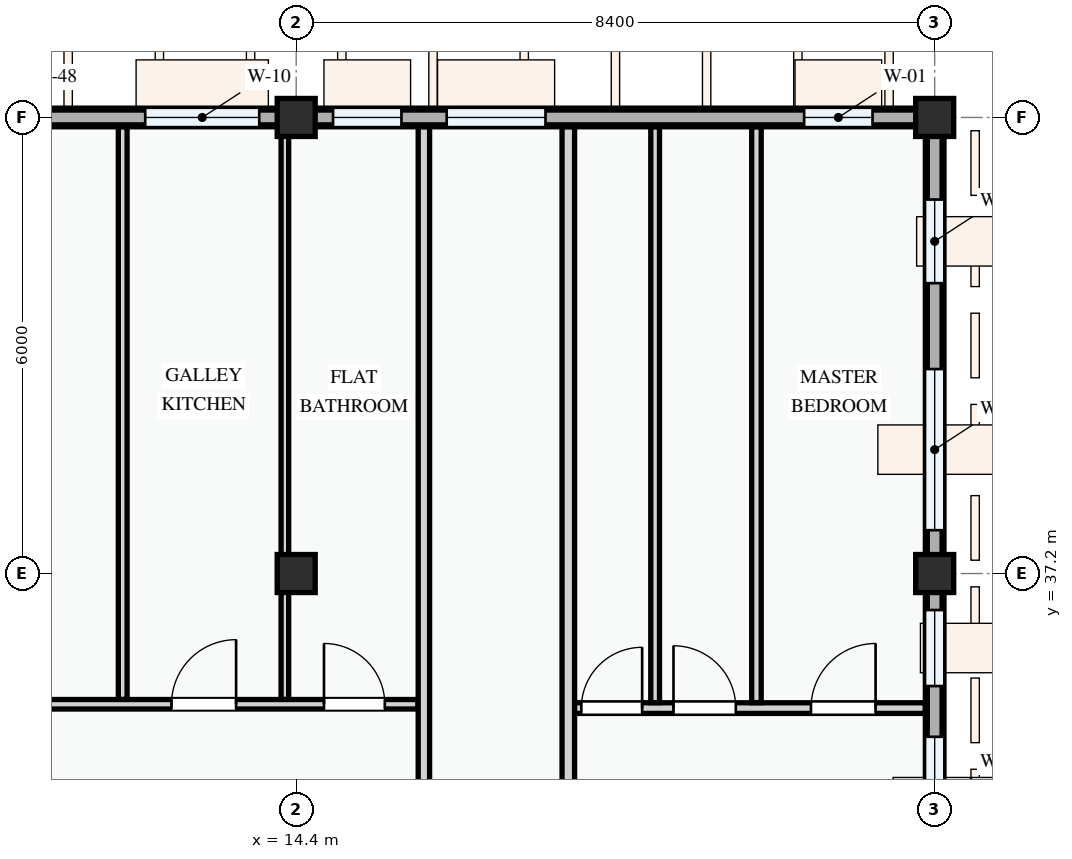
"""IFC4 building model, lengths in metres.
Left out: names, types, materials, properties, quantities, classifications, styles, units other than length and angle.
Written with IfcOpenShell. Run it as: python <this file> out.ifc"""

import sys

from ifc_helpers import new_model, si_unit, direction, frame, frame_2d, origin, origin_2d, place, context, subcontext, project, spatial, rectangle, extrude, element, fill, save


model = new_model("IFC4")
c1 = context("Model", 3, precision=1e-05, world=origin(), true_north=direction((0.0, 1.0)))
c2 = subcontext(c1, "Body", "Model", "MODEL_VIEW")
j1 = project(units=[si_unit("LENGTHUNIT", "METRE"), si_unit("PLANEANGLEUNIT", "RADIAN")], contexts=[c1])
p1 = place(None, origin())
s1 = spatial("IfcSite", under=j1, at=p1, CompositionType="ELEMENT")
p2 = place(p1, origin())
s2 = spatial("IfcBuilding", under=s1, at=p2, CompositionType="ELEMENT")
p3 = place(p2, frame((0.0, 0.0, 34.5)))
s3 = spatial("IfcBuildingStorey", under=s2, at=p3, CompositionType="ELEMENT", Elevation=34.5)
for number, where, z_axis, x_axis in (
    (1, (14.4, 37.2, 0.0), (0.0, 0.0, 1.0), (1.0, 0.0, 0.0)),
    (2, (14.4, 43.2, 0.0), (0.0, 0.0, 1.0), (1.0, 0.0, 0.0)),
    (3, (22.8, 37.2, 0.0), (0.0, 0.0, 1.0), (1.0, 0.0, 0.0)),
    (4, (22.8, 43.2, 0.0), (0.0, 0.0, 1.0), (1.0, 0.0, 0.0)),
):
    element("IfcColumn", number, at=place(p3, frame(where, z_axis=z_axis, x_axis=x_axis)), inside=s3, PredefinedType="COLUMN", context=c2, shape_type="SweptSolid", body=[
        extrude(rectangle(XDim=0.5, YDim=0.5, at=origin_2d()), origin(), (0.0, 0.0, 1.0), 3.3),
    ])
p4 = place(p3, frame((22.8, 28.8, 0.0), z_axis=(0.0, 0.0, 1.0), x_axis=(0.0, 1.0, 0.0)))
e5 = element("IfcWall", 5, at=p4, inside=s3, PredefinedType="STANDARD", context=c2, shape_type="SweptSolid", body=[
    extrude(rectangle(XDim=8.4, YDim=0.245, at=frame_2d((4.2, 0.0))), origin(), (0.0, 0.0, 1.0), 2.425),
])
p5 = place(p4, frame((0.53, 0.0, 0.78)))
e6 = element("IfcOpeningElement", 6, at=p5, cuts=e5, PredefinedType="OPENING", context=c2, shape_type="SweptSolid", body=[
    extrude(rectangle(XDim=0.95, YDim=1.15, at=frame_2d((0.475, 0.575))), frame((0.0, 0.133, 0.0), z_axis=(0.0, -1.0, 0.0), x_axis=(1.0, 0.0, 0.0)), (0.0, 0.0, 1.0), 0.265),
])
p6 = place(p4, frame((2.367, 0.0, 0.78)))
e7 = element("IfcOpeningElement", 7, at=p6, cuts=e5, PredefinedType="OPENING", context=c2, shape_type="SweptSolid", body=[
    extrude(rectangle(XDim=1.38, YDim=1.48, at=frame_2d((0.69, 0.74))), frame((0.0, 0.133, 0.0), z_axis=(0.0, -1.0, 0.0), x_axis=(1.0, 0.0, 0.0)), (0.0, 0.0, 1.0), 0.265),
])
p7 = place(p4, frame((4.532, 0.0, 0.78)))
e8 = element("IfcOpeningElement", 8, at=p7, cuts=e5, PredefinedType="OPENING", context=c2, shape_type="SweptSolid", body=[
    extrude(rectangle(XDim=1.72, YDim=1.52, at=frame_2d((0.86, 0.76))), frame((0.0, 0.133, 0.0), z_axis=(0.0, -1.0, 0.0), x_axis=(1.0, 0.0, 0.0)), (0.0, 0.0, 1.0), 0.265),
])
p8 = place(p4, frame((6.92, 0.0, 0.78)))
e9 = element("IfcOpeningElement", 9, at=p8, cuts=e5, PredefinedType="OPENING", context=c2, shape_type="SweptSolid", body=[
    extrude(rectangle(XDim=1.0, YDim=1.25, at=frame_2d((0.5, 0.625))), frame((0.0, 0.133, 0.0), z_axis=(0.0, -1.0, 0.0), x_axis=(1.0, 0.0, 0.0)), (0.0, 0.0, 1.0), 0.265),
])
p9 = place(p3, frame((22.8, 37.2, 0.0), z_axis=(0.0, 0.0, 1.0), x_axis=(0.0, 1.0, 0.0)))
e10 = element("IfcWall", 10, at=p9, inside=s3, PredefinedType="STANDARD", context=c2, shape_type="SweptSolid", body=[
    extrude(rectangle(XDim=6.0, YDim=0.245, at=frame_2d((3.0, 0.0))), origin(), (0.0, 0.0, 1.0), 2.575),
])
p10 = place(p9, frame((0.57, 0.0, 0.78)))
e11 = element("IfcOpeningElement", 11, at=p10, cuts=e10, PredefinedType="OPENING", context=c2, shape_type="SweptSolid", body=[
    extrude(rectangle(XDim=2.12, YDim=1.44, at=frame_2d((1.06, 0.72))), frame((0.0, 0.133, 0.0), z_axis=(0.0, -1.0, 0.0), x_axis=(1.0, 0.0, 0.0)), (0.0, 0.0, 1.0), 0.265),
])
p11 = place(p9, frame((3.82, 0.0, 0.78)))
e12 = element("IfcOpeningElement", 12, at=p11, cuts=e10, PredefinedType="OPENING", context=c2, shape_type="SweptSolid", body=[
    extrude(rectangle(XDim=1.1, YDim=1.3, at=frame_2d((0.55, 0.65))), frame((0.0, 0.133, 0.0), z_axis=(0.0, -1.0, 0.0), x_axis=(1.0, 0.0, 0.0)), (0.0, 0.0, 1.0), 0.265),
])
p12 = place(p3, frame((22.8, 43.2, 0.0), z_axis=(0.0, 0.0, 1.0), x_axis=(-1.0, 0.0, 0.0)))
e13 = element("IfcWall", 13, at=p12, inside=s3, PredefinedType="STANDARD", context=c2, shape_type="SweptSolid", body=[
    extrude(rectangle(XDim=8.4, YDim=0.245, at=frame_2d((4.2, 0.0))), origin(), (0.0, 0.0, 1.0), 2.375),
])
p13 = place(p12, frame((0.817, 0.0, 0.78)))
e14 = element("IfcOpeningElement", 14, at=p13, cuts=e13, PredefinedType="OPENING", context=c2, shape_type="SweptSolid", body=[
    extrude(rectangle(XDim=0.9, YDim=1.2, at=frame_2d((0.45, 0.6))), frame((0.0, 0.133, 0.0), z_axis=(0.0, -1.0, 0.0), x_axis=(1.0, 0.0, 0.0)), (0.0, 0.0, 1.0), 0.265),
])
p14 = place(p12, frame((5.12, 0.0, 0.78)))
e15 = element("IfcOpeningElement", 15, at=p14, cuts=e13, PredefinedType="OPENING", context=c2, shape_type="SweptSolid", body=[
    extrude(rectangle(XDim=1.3, YDim=1.4, at=frame_2d((0.65, 0.7))), frame((0.0, 0.133, 0.0), z_axis=(0.0, -1.0, 0.0), x_axis=(1.0, 0.0, 0.0)), (0.0, 0.0, 1.0), 0.265),
])
p15 = place(p12, frame((7.015, 0.0, 0.78)))
e16 = element("IfcOpeningElement", 16, at=p15, cuts=e13, PredefinedType="OPENING", context=c2, shape_type="SweptSolid", body=[
    extrude(rectangle(XDim=0.9, YDim=1.2, at=frame_2d((0.45, 0.6))), frame((0.0, 0.133, 0.0), z_axis=(0.0, -1.0, 0.0), x_axis=(1.0, 0.0, 0.0)), (0.0, 0.0, 1.0), 0.265),
])
p16 = place(p3, frame((14.4, 43.2, 0.0), z_axis=(0.0, 0.0, 1.0), x_axis=(-1.0, 0.0, 0.0)))
e17 = element("IfcWall", 17, at=p16, inside=s3, PredefinedType="STANDARD", context=c2, shape_type="SweptSolid", body=[
    extrude(rectangle(XDim=6.0, YDim=0.245, at=frame_2d((3.0, 0.0))), origin(), (0.0, 0.0, 1.0), 2.525),
])
p17 = place(p16, frame((0.486, 0.0, 0.78)))
e18 = element("IfcOpeningElement", 18, at=p17, cuts=e17, PredefinedType="OPENING", context=c2, shape_type="SweptSolid", body=[
    extrude(rectangle(XDim=1.5, YDim=1.5, at=frame_2d((0.75, 0.75))), frame((0.0, 0.133, 0.0), z_axis=(0.0, -1.0, 0.0), x_axis=(1.0, 0.0, 0.0)), (0.0, 0.0, 1.0), 0.265),
])
p18 = place(p16, frame((3.386, 0.0, 0.78)))
e19 = element("IfcOpeningElement", 19, at=p18, cuts=e17, PredefinedType="OPENING", context=c2, shape_type="SweptSolid", body=[
    extrude(rectangle(XDim=1.32, YDim=1.35, at=frame_2d((0.66, 0.675))), frame((0.0, 0.133, 0.0), z_axis=(0.0, -1.0, 0.0), x_axis=(1.0, 0.0, 0.0)), (0.0, 0.0, 1.0), 0.265),
])
p19 = place(p3, frame((22.8, 22.8, 3.3), z_axis=(0.0, 0.0, 1.0), x_axis=(0.0, 1.0, 0.0)))
e20 = element("IfcWall", 20, at=p19, inside=s3, PredefinedType="PARAPET", context=c2, shape_type="SweptSolid", body=[
    extrude(rectangle(XDim=20.4, YDim=0.195, at=frame_2d((10.2, 0.0))), origin(), (0.0, 0.0, 1.0), 1.15),
])
p20 = place(p3, frame((22.8, 43.2, 3.3), z_axis=(0.0, 0.0, 1.0), x_axis=(-1.0, 0.0, 0.0)))
e21 = element("IfcWall", 21, at=p20, inside=s3, PredefinedType="PARAPET", context=c2, shape_type="SweptSolid", body=[
    extrude(rectangle(XDim=14.4, YDim=0.195, at=frame_2d((7.2, 0.0))), origin(), (0.0, 0.0, 1.0), 1.15),
])
p21 = place(p3, frame((8.524, 35.48, 0.0), z_axis=(0.0, 0.0, 1.0), x_axis=(1.0, 0.0, 0.0)))
e22 = element("IfcWall", 22, at=p21, inside=s3, PredefinedType="PARTITIONING", context=c2, shape_type="SweptSolid", body=[
    extrude(rectangle(XDim=7.479, YDim=0.125, at=frame_2d((3.739, 0.0))), origin(), (0.0, 0.0, 1.0), 3.0),
])
p22 = place(p21, frame((1.339, 0.0, 0.0)))
e23 = element("IfcOpeningElement", 23, at=p22, cuts=e22, PredefinedType="OPENING", context=c2, shape_type="SweptSolid", body=[
    extrude(rectangle(XDim=0.82, YDim=2.08, at=frame_2d((0.41, 1.04))), frame((0.0, 0.073, 0.0), z_axis=(0.0, -1.0, 0.0), x_axis=(1.0, 0.0, 0.0)), (0.0, 0.0, 1.0), 0.145),
])
p23 = place(p21, frame((4.235, 0.0, 0.0)))
e24 = element("IfcOpeningElement", 24, at=p23, cuts=e22, PredefinedType="OPENING", context=c2, shape_type="SweptSolid", body=[
    extrude(rectangle(XDim=0.85, YDim=2.1, at=frame_2d((0.425, 1.05))), frame((0.0, 0.073, 0.0), z_axis=(0.0, -1.0, 0.0), x_axis=(1.0, 0.0, 0.0)), (0.0, 0.0, 1.0), 0.145),
])
p24 = place(p21, frame((6.241, 0.0, 0.0)))
e25 = element("IfcOpeningElement", 25, at=p24, cuts=e22, PredefinedType="OPENING", context=c2, shape_type="SweptSolid", body=[
    extrude(rectangle(XDim=0.8, YDim=2.1, at=frame_2d((0.4, 1.05))), frame((0.0, 0.073, 0.0), z_axis=(0.0, -1.0, 0.0), x_axis=(1.0, 0.0, 0.0)), (0.0, 0.0, 1.0), 0.145),
])
p25 = place(p3, frame((12.118, 35.544, 0.0), z_axis=(0.0, 0.0, 1.0), x_axis=(0.0, 1.0, 0.0)))
e26 = element("IfcWall", 26, at=p25, inside=s3, PredefinedType="PARTITIONING", context=c2, shape_type="SweptSolid", body=[
    extrude(rectangle(XDim=7.531, YDim=0.115, at=frame_2d((3.766, 0.0))), origin(), (0.0, 0.0, 1.0), 3.0),
])
p26 = place(p3, frame((14.251, 35.544, 0.0), z_axis=(0.0, 0.0, 1.0), x_axis=(0.0, 1.0, 0.0)))
e27 = element("IfcWall", 27, at=p26, inside=s3, PredefinedType="PARTITIONING", context=c2, shape_type="SweptSolid", body=[
    extrude(rectangle(XDim=7.531, YDim=0.1, at=frame_2d((3.766, 0.0))), origin(), (0.0, 0.0, 1.0), 2.425),
])
p27 = place(p3, frame((17.98, 35.43, 0.0), z_axis=(0.0, 0.0, 1.0), x_axis=(1.0, 0.0, 0.0)))
e28 = element("IfcWall", 28, at=p27, inside=s3, PredefinedType="PARTITIONING", context=c2, shape_type="SweptSolid", body=[
    extrude(rectangle(XDim=4.696, YDim=0.14, at=frame_2d((2.348, 0.0))), origin(), (0.0, 0.0, 1.0), 3.0),
])
p28 = place(p27, frame((0.171, 0.0, 0.0)))
e29 = element("IfcOpeningElement", 29, at=p28, cuts=e28, PredefinedType="OPENING", context=c2, shape_type="SweptSolid", body=[
    extrude(rectangle(XDim=0.8, YDim=2.1, at=frame_2d((0.4, 1.05))), frame((0.0, 0.08, 0.0), z_axis=(0.0, -1.0, 0.0), x_axis=(1.0, 0.0, 0.0)), (0.0, 0.0, 1.0), 0.16),
])
p29 = place(p27, frame((1.384, 0.0, 0.0)))
e30 = element("IfcOpeningElement", 30, at=p29, cuts=e28, PredefinedType="OPENING", context=c2, shape_type="SweptSolid", body=[
    extrude(rectangle(XDim=0.82, YDim=2.08, at=frame_2d((0.41, 1.04))), frame((0.0, 0.08, 0.0), z_axis=(0.0, -1.0, 0.0), x_axis=(1.0, 0.0, 0.0)), (0.0, 0.0, 1.0), 0.16),
])
p30 = place(p27, frame((3.193, 0.0, 0.0)))
e31 = element("IfcOpeningElement", 31, at=p30, cuts=e28, PredefinedType="OPENING", context=c2, shape_type="SweptSolid", body=[
    extrude(rectangle(XDim=0.85, YDim=2.1, at=frame_2d((0.425, 1.05))), frame((0.0, 0.08, 0.0), z_axis=(0.0, -1.0, 0.0), x_axis=(1.0, 0.0, 0.0)), (0.0, 0.0, 1.0), 0.16),
])
p31 = place(p3, frame((20.455, 35.502, 0.0), z_axis=(0.0, 0.0, 1.0), x_axis=(0.0, 1.0, 0.0)))
e32 = element("IfcWall", 32, at=p31, inside=s3, PredefinedType="PARTITIONING", context=c2, shape_type="SweptSolid", body=[
    extrude(rectangle(XDim=7.574, YDim=0.125, at=frame_2d((3.787, 0.0))), origin(), (0.0, 0.0, 1.0), 3.0),
])
p32 = place(p3, frame((19.122, 35.502, 0.0), z_axis=(0.0, 0.0, 1.0), x_axis=(0.0, 1.0, 0.0)))
e33 = element("IfcWall", 33, at=p32, inside=s3, PredefinedType="PARTITIONING", context=c2, shape_type="SweptSolid", body=[
    extrude(rectangle(XDim=7.574, YDim=0.115, at=frame_2d((3.787, 0.0))), origin(), (0.0, 0.0, 1.0), 3.0),
])
p33 = place(p3, frame((16.08, 22.66, 0.0), z_axis=(0.0, 0.0, 1.0), x_axis=(0.0, 1.0, 0.0)))
e34 = element("IfcWall", 34, at=p33, inside=s3, PredefinedType="PARTITIONING", context=c2, shape_type="SweptSolid", body=[
    extrude(rectangle(XDim=20.416, YDim=0.15, at=frame_2d((10.208, 0.0))), origin(), (0.0, 0.0, 1.0), 3.0),
])
p34 = place(p33, frame((2.691, 0.0, 0.0)))
e35 = element("IfcOpeningElement", 35, at=p34, cuts=e34, PredefinedType="OPENING", context=c2, shape_type="SweptSolid", body=[
    extrude(rectangle(XDim=0.92, YDim=2.1, at=frame_2d((0.46, 1.05))), frame((0.0, 0.085, 0.0), z_axis=(0.0, -1.0, 0.0), x_axis=(1.0, 0.0, 0.0)), (0.0, 0.0, 1.0), 0.17),
])
p35 = place(p33, frame((9.91, 0.0, 0.0)))
e36 = element("IfcOpeningElement", 36, at=p35, cuts=e34, PredefinedType="OPENING", context=c2, shape_type="SweptSolid", body=[
    extrude(rectangle(XDim=0.92, YDim=2.1, at=frame_2d((0.46, 1.05))), frame((0.0, 0.085, 0.0), z_axis=(0.0, -1.0, 0.0), x_axis=(1.0, 0.0, 0.0)), (0.0, 0.0, 1.0), 0.17),
])
p36 = place(p3, frame((17.98, 22.66, 0.0), z_axis=(0.0, 0.0, 1.0), x_axis=(0.0, 1.0, 0.0)))
e37 = element("IfcWall", 37, at=p36, inside=s3, PredefinedType="PARTITIONING", context=c2, shape_type="SweptSolid", body=[
    extrude(rectangle(XDim=20.416, YDim=0.165, at=frame_2d((10.208, 0.0))), origin(), (0.0, 0.0, 1.0), 3.0),
])
p37 = place(p36, frame((2.611, 0.0, 0.0)))
e38 = element("IfcOpeningElement", 38, at=p37, cuts=e37, PredefinedType="OPENING", context=c2, shape_type="SweptSolid", body=[
    extrude(rectangle(XDim=0.92, YDim=2.1, at=frame_2d((0.46, 1.05))), frame((0.0, 0.093, 0.0), z_axis=(0.0, -1.0, 0.0), x_axis=(1.0, 0.0, 0.0)), (0.0, 0.0, 1.0), 0.185),
])
p38 = place(p36, frame((9.885, 0.0, 0.0)))
e39 = element("IfcOpeningElement", 39, at=p38, cuts=e37, PredefinedType="OPENING", context=c2, shape_type="SweptSolid", body=[
    extrude(rectangle(XDim=0.92, YDim=2.1, at=frame_2d((0.46, 1.05))), frame((0.0, 0.093, 0.0), z_axis=(0.0, -1.0, 0.0), x_axis=(1.0, 0.0, 0.0)), (0.0, 0.0, 1.0), 0.185),
])
p39 = place(p7, origin())
e40 = element("IfcWindow", 40, at=p39, inside=s3, PartitioningType="DOUBLE_PANEL_VERTICAL", PredefinedType="WINDOW", context=c2, shape_type="SweptSolid", body=[
    extrude(rectangle(XDim=1.72, YDim=1.52, at=frame_2d((0.86, 0.76))), frame((0.0, 0.03, 0.0), z_axis=(0.0, -1.0, 0.0), x_axis=(1.0, 0.0, 0.0)), (0.0, 0.0, 1.0), 0.06),
])
fill(e8, e40)
p40 = place(p8, origin())
e41 = element("IfcWindow", 41, at=p40, inside=s3, PartitioningType="SINGLE_PANEL", PredefinedType="WINDOW", context=c2, shape_type="SweptSolid", body=[
    extrude(rectangle(XDim=1.0, YDim=1.25, at=frame_2d((0.5, 0.625))), frame((0.0, 0.03, 0.0), z_axis=(0.0, -1.0, 0.0), x_axis=(1.0, 0.0, 0.0)), (0.0, 0.0, 1.0), 0.06),
])
fill(e9, e41)
p41 = place(p10, origin())
e42 = element("IfcWindow", 42, at=p41, inside=s3, PartitioningType="DOUBLE_PANEL_VERTICAL", PredefinedType="WINDOW", context=c2, shape_type="SweptSolid", body=[
    extrude(rectangle(XDim=2.12, YDim=1.44, at=frame_2d((1.06, 0.72))), frame((0.0, 0.03, 0.0), z_axis=(0.0, -1.0, 0.0), x_axis=(1.0, 0.0, 0.0)), (0.0, 0.0, 1.0), 0.06),
])
fill(e11, e42)
p42 = place(p11, origin())
e43 = element("IfcWindow", 43, at=p42, inside=s3, PartitioningType="SINGLE_PANEL", PredefinedType="WINDOW", context=c2, shape_type="SweptSolid", body=[
    extrude(rectangle(XDim=1.1, YDim=1.3, at=frame_2d((0.55, 0.65))), frame((0.0, 0.03, 0.0), z_axis=(0.0, -1.0, 0.0), x_axis=(1.0, 0.0, 0.0)), (0.0, 0.0, 1.0), 0.06),
])
fill(e12, e43)
p43 = place(p13, origin())
e44 = element("IfcWindow", 44, at=p43, inside=s3, PartitioningType="SINGLE_PANEL", PredefinedType="WINDOW", context=c2, shape_type="SweptSolid", body=[
    extrude(rectangle(XDim=0.9, YDim=1.2, at=frame_2d((0.45, 0.6))), frame((0.0, 0.03, 0.0), z_axis=(0.0, -1.0, 0.0), x_axis=(1.0, 0.0, 0.0)), (0.0, 0.0, 1.0), 0.06),
])
fill(e14, e44)
p44 = place(p14, origin())
e45 = element("IfcWindow", 45, at=p44, inside=s3, PartitioningType="SINGLE_PANEL", PredefinedType="WINDOW", context=c2, shape_type="SweptSolid", body=[
    extrude(rectangle(XDim=1.3, YDim=1.4, at=frame_2d((0.65, 0.7))), frame((0.0, 0.03, 0.0), z_axis=(0.0, -1.0, 0.0), x_axis=(1.0, 0.0, 0.0)), (0.0, 0.0, 1.0), 0.06),
])
fill(e15, e45)
p45 = place(p15, origin())
e46 = element("IfcWindow", 46, at=p45, inside=s3, PartitioningType="SINGLE_PANEL", PredefinedType="WINDOW", context=c2, shape_type="SweptSolid", body=[
    extrude(rectangle(XDim=0.9, YDim=1.2, at=frame_2d((0.45, 0.6))), frame((0.0, 0.03, 0.0), z_axis=(0.0, -1.0, 0.0), x_axis=(1.0, 0.0, 0.0)), (0.0, 0.0, 1.0), 0.06),
])
fill(e16, e46)
p46 = place(p17, origin())
e47 = element("IfcWindow", 47, at=p46, inside=s3, PartitioningType="SINGLE_PANEL", PredefinedType="WINDOW", context=c2, shape_type="SweptSolid", body=[
    extrude(rectangle(XDim=1.5, YDim=1.5, at=frame_2d((0.75, 0.75))), frame((0.0, 0.03, 0.0), z_axis=(0.0, -1.0, 0.0), x_axis=(1.0, 0.0, 0.0)), (0.0, 0.0, 1.0), 0.06),
])
fill(e18, e47)
p47 = place(p23, origin())
e48 = element("IfcDoor", 48, at=p47, inside=s3, OperationType="SINGLE_SWING_RIGHT", PredefinedType="DOOR", context=c2, shape_type="SweptSolid", body=[
    extrude(rectangle(XDim=0.85, YDim=2.1, at=frame_2d((0.425, 1.05))), frame((0.0, 0.025, 0.0), z_axis=(0.0, -1.0, 0.0), x_axis=(1.0, 0.0, 0.0)), (0.0, 0.0, 1.0), 0.05),
])
fill(e24, e48)
p48 = place(p24, origin())
e49 = element("IfcDoor", 49, at=p48, inside=s3, OperationType="SINGLE_SWING_LEFT", PredefinedType="DOOR", context=c2, shape_type="SweptSolid", body=[
    extrude(rectangle(XDim=0.8, YDim=2.1, at=frame_2d((0.4, 1.05))), frame((0.0, 0.025, 0.0), z_axis=(0.0, -1.0, 0.0), x_axis=(1.0, 0.0, 0.0)), (0.0, 0.0, 1.0), 0.05),
])
fill(e25, e49)
p49 = place(p28, origin())
e50 = element("IfcDoor", 50, at=p49, inside=s3, OperationType="SINGLE_SWING_RIGHT", PredefinedType="DOOR", context=c2, shape_type="SweptSolid", body=[
    extrude(rectangle(XDim=0.8, YDim=2.1, at=frame_2d((0.4, 1.05))), frame((0.0, 0.025, 0.0), z_axis=(0.0, -1.0, 0.0), x_axis=(1.0, 0.0, 0.0)), (0.0, 0.0, 1.0), 0.05),
])
fill(e29, e50)
p50 = place(p29, origin())
e51 = element("IfcDoor", 51, at=p50, inside=s3, OperationType="SINGLE_SWING_LEFT", PredefinedType="DOOR", context=c2, shape_type="SweptSolid", body=[
    extrude(rectangle(XDim=0.82, YDim=2.08, at=frame_2d((0.41, 1.04))), frame((0.0, 0.025, 0.0), z_axis=(0.0, -1.0, 0.0), x_axis=(1.0, 0.0, 0.0)), (0.0, 0.0, 1.0), 0.05),
])
fill(e30, e51)
p51 = place(p30, origin())
e52 = element("IfcDoor", 52, at=p51, inside=s3, OperationType="SINGLE_SWING_RIGHT", PredefinedType="DOOR", context=c2, shape_type="SweptSolid", body=[
    extrude(rectangle(XDim=0.85, YDim=2.1, at=frame_2d((0.425, 1.05))), frame((0.0, 0.025, 0.0), z_axis=(0.0, -1.0, 0.0), x_axis=(1.0, 0.0, 0.0)), (0.0, 0.0, 1.0), 0.05),
])
fill(e31, e52)
save(model, sys.argv[1])
